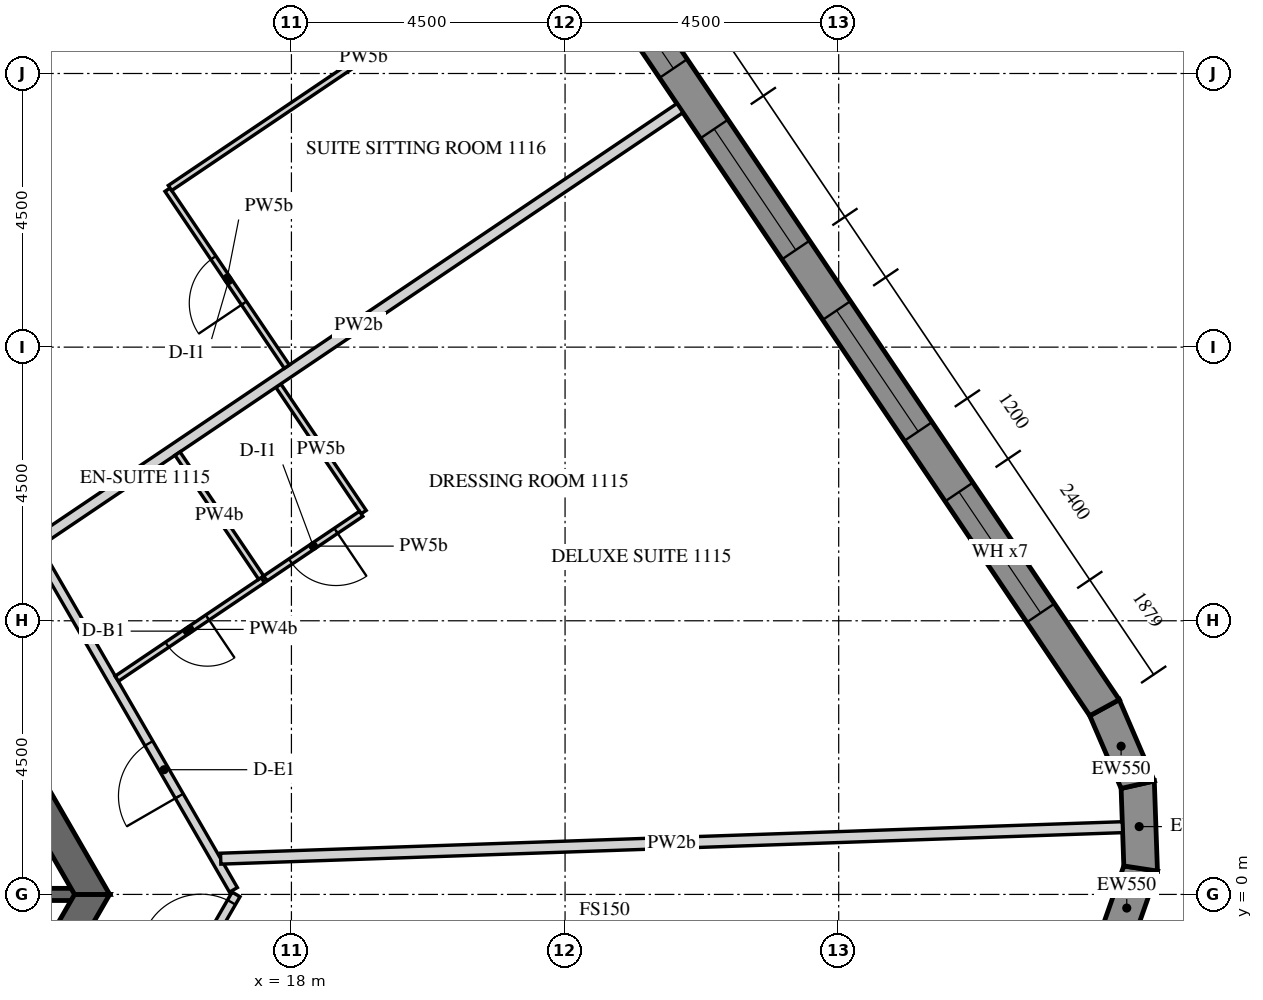
"""IFC4 building model, lengths in metres.
Left out: names, types, materials, properties, quantities, classifications, styles, units other than length and angle.
Written with IfcOpenShell. Run it as: python <this file> out.ifc"""

import sys

from ifc_helpers import new_model, si_unit, direction, frame, frame_2d, origin, place, context, subcontext, project, spatial, polyline, rectangle, outline, extrude, element, fill, save


model = new_model("IFC4")
c1 = context("Model", 3, precision=1e-05, world=origin(), true_north=direction((0.0, 1.0)))
c2 = subcontext(c1, "Body", "Model", "MODEL_VIEW")
j1 = project(units=[si_unit("LENGTHUNIT", "METRE"), si_unit("PLANEANGLEUNIT", "RADIAN")], contexts=[c1])
p1 = place(None, origin())
s1 = spatial("IfcSite", under=j1, at=p1, CompositionType="ELEMENT")
p2 = place(p1, origin())
s2 = spatial("IfcBuilding", under=s1, at=p2, CompositionType="ELEMENT")
p3 = place(p2, frame((0.0, 0.0, 156.6)))
s3 = spatial("IfcBuildingStorey", under=s2, at=p3, CompositionType="ELEMENT", Elevation=156.6)
p4 = place(p3, frame((31.509, -0.875, -0.15), z_axis=(0.0, 0.0, 1.0), x_axis=(0.33111537203, 0.943590276765, 0.0)))
e1 = element("IfcWall", 1, at=p4, inside=s3, PredefinedType="SOLIDWALL", context=c2, shape_type="SweptSolid", body=[
    extrude(outline(polyline([(-0.026, -0.275), (1.431, -0.275), (1.327, 0.275), (0.026, 0.275), (-0.026, -0.275)])), origin(), (0.0, 0.0, 1.0), 3.9),
])
p5 = place(p3, frame((31.966, 0.426, -0.15), z_axis=(0.0, 0.0, 1.0), x_axis=(-0.034876908462, 0.999391615562, 0.0)))
e2 = element("IfcWall", 2, at=p5, inside=s3, PredefinedType="SOLIDWALL", context=c2, shape_type="SweptSolid", body=[
    extrude(outline(polyline([(-0.052, -0.275), (1.431, -0.275), (1.327, 0.275), (0.052, 0.275), (-0.052, -0.275)])), origin(), (0.0, 0.0, 1.0), 3.9),
])
p6 = place(p3, frame((31.917, 1.804, -0.15), z_axis=(0.0, 0.0, 1.0), x_axis=(-0.396225741392, 0.918153125496, 0.0)))
e3 = element("IfcWall", 3, at=p6, inside=s3, PredefinedType="SOLIDWALL", context=c2, shape_type="SweptSolid", body=[
    extrude(outline(polyline([(-0.052, -0.275), (1.405, -0.275), (1.353, 0.275), (0.052, 0.275), (-0.052, -0.275)])), origin(), (0.0, 0.0, 1.0), 3.9),
])
p7 = place(p3, frame((31.371, 3.071, -0.15), z_axis=(0.0, 0.0, 1.0), x_axis=(-0.559189891278, 0.829039604297, 0.0)))
e4 = element("IfcWall", 4, at=p7, inside=s3, PredefinedType="SOLIDWALL", context=c2, shape_type="SweptSolid", body=[
    extrude(outline(polyline([(-0.026, -0.275), (27.781, -0.275), (27.736, 0.275), (0.026, 0.275), (-0.026, -0.275)])), origin(), (0.0, 0.0, 1.0), 3.9),
])
p8 = place(p7, frame((1.879, 0.0, 1.05)))
e5 = element("IfcOpeningElement", 5, at=p8, cuts=e4, PredefinedType="OPENING", context=c2, shape_type="SweptSolid", body=[
    extrude(rectangle(XDim=2.4, YDim=2.4, at=frame_2d((1.2, 1.2))), frame((0.0, 0.285, 0.0), z_axis=(0.0, -1.0, 0.0), x_axis=(1.0, 0.0, 0.0)), (0.0, 0.0, 1.0), 0.57),
])
p9 = place(p7, frame((5.479, 0.0, 1.05)))
e6 = element("IfcOpeningElement", 6, at=p9, cuts=e4, PredefinedType="OPENING", context=c2, shape_type="SweptSolid", body=[
    extrude(rectangle(XDim=2.4, YDim=2.4, at=frame_2d((1.2, 1.2))), frame((0.0, 0.285, 0.0), z_axis=(0.0, -1.0, 0.0), x_axis=(1.0, 0.0, 0.0)), (0.0, 0.0, 1.0), 0.57),
])
p10 = place(p7, frame((9.079, 0.0, 1.05)))
e7 = element("IfcOpeningElement", 7, at=p10, cuts=e4, PredefinedType="OPENING", context=c2, shape_type="SweptSolid", body=[
    extrude(rectangle(XDim=2.4, YDim=2.4, at=frame_2d((1.2, 1.2))), frame((0.0, 0.285, 0.0), z_axis=(0.0, -1.0, 0.0), x_axis=(1.0, 0.0, 0.0)), (0.0, 0.0, 1.0), 0.57),
])
p11 = place(p7, frame((12.679, 0.0, 1.05)))
e8 = element("IfcOpeningElement", 8, at=p11, cuts=e4, PredefinedType="OPENING", context=c2, shape_type="SweptSolid", body=[
    extrude(rectangle(XDim=2.4, YDim=2.4, at=frame_2d((1.2, 1.2))), frame((0.0, 0.285, 0.0), z_axis=(0.0, -1.0, 0.0), x_axis=(1.0, 0.0, 0.0)), (0.0, 0.0, 1.0), 0.57),
])
p12 = place(p7, frame((16.279, 0.0, 1.05)))
e9 = element("IfcOpeningElement", 9, at=p12, cuts=e4, PredefinedType="OPENING", context=c2, shape_type="SweptSolid", body=[
    extrude(rectangle(XDim=2.4, YDim=2.4, at=frame_2d((1.2, 1.2))), frame((0.0, 0.285, 0.0), z_axis=(0.0, -1.0, 0.0), x_axis=(1.0, 0.0, 0.0)), (0.0, 0.0, 1.0), 0.57),
])
p13 = place(p7, frame((19.879, 0.0, 1.05)))
e10 = element("IfcOpeningElement", 10, at=p13, cuts=e4, PredefinedType="OPENING", context=c2, shape_type="SweptSolid", body=[
    extrude(rectangle(XDim=2.4, YDim=2.4, at=frame_2d((1.2, 1.2))), frame((0.0, 0.285, 0.0), z_axis=(0.0, -1.0, 0.0), x_axis=(1.0, 0.0, 0.0)), (0.0, 0.0, 1.0), 0.57),
])
p14 = place(p7, frame((23.479, 0.0, 1.05)))
e11 = element("IfcOpeningElement", 11, at=p14, cuts=e4, PredefinedType="OPENING", context=c2, shape_type="SweptSolid", body=[
    extrude(rectangle(XDim=2.4, YDim=2.4, at=frame_2d((1.2, 1.2))), frame((0.0, 0.285, 0.0), z_axis=(0.0, -1.0, 0.0), x_axis=(1.0, 0.0, 0.0)), (0.0, 0.0, 1.0), 0.57),
])
p15 = place(p3, frame((7.361, -12.75, -0.15), z_axis=(0.0, 0.0, 1.0), x_axis=(0.50000571537, 0.866022103989, 0.0)))
e12 = element("IfcWall", 12, at=p15, inside=s3, PredefinedType="SHEAR", context=c2, shape_type="SweptSolid", body=[
    extrude(outline(polyline([(-0.144, -0.25), (14.867, -0.25), (14.578, 0.25), (0.144, 0.25), (-0.144, -0.25)])), origin(), (0.0, 0.0, 1.0), 3.9),
])
p16 = place(p15, frame((6.49, 0.0, 0.15)))
e13 = element("IfcOpeningElement", 13, at=p16, cuts=e12, PredefinedType="OPENING", context=c2, shape_type="SweptSolid", body=[
    extrude(rectangle(XDim=1.8, YDim=2.4, at=frame_2d((0.9, 1.2))), frame((0.0, 0.26, 0.0), z_axis=(0.0, -1.0, 0.0), x_axis=(1.0, 0.0, 0.0)), (0.0, 0.0, 1.0), 0.52),
])
p17 = place(p3, frame((14.722, 0.0, -0.15), z_axis=(0.0, 0.0, 1.0), x_axis=(-0.50000571537, 0.866022103989, 0.0)))
e14 = element("IfcWall", 14, at=p17, inside=s3, PredefinedType="SHEAR", context=c2, shape_type="SweptSolid", body=[
    extrude(outline(polyline([(-0.144, -0.25), (14.867, -0.25), (14.578, 0.25), (0.144, 0.25), (-0.144, -0.25)])), origin(), (0.0, 0.0, 1.0), 3.9),
])
p18 = place(p17, frame((6.432, 0.0, 0.15)))
e15 = element("IfcOpeningElement", 15, at=p18, cuts=e14, PredefinedType="OPENING", context=c2, shape_type="SweptSolid", body=[
    extrude(rectangle(XDim=1.8, YDim=2.4, at=frame_2d((0.9, 1.2))), frame((0.0, 0.26, 0.0), z_axis=(0.0, -1.0, 0.0), x_axis=(1.0, 0.0, 0.0)), (0.0, 0.0, 1.0), 0.52),
])
p19 = place(p3, frame((7.506, 13.0, -0.15), z_axis=(0.0, 0.0, 1.0), x_axis=(0.499988271576, 0.866032175087, 0.0)))
e16 = element("IfcWall", 16, at=p19, inside=s3, PredefinedType="SHEAR", context=c2, shape_type="SweptSolid", body=[
    extrude(rectangle(XDim=15.424, YDim=0.5, at=frame_2d((7.712, 0.0))), origin(), (0.0, 0.0, 1.0), 3.9),
])
p20 = place(p19, frame((6.812, 0.0, 0.15)))
e17 = element("IfcOpeningElement", 17, at=p20, cuts=e16, PredefinedType="OPENING", context=c2, shape_type="SweptSolid", body=[
    extrude(rectangle(XDim=1.8, YDim=2.4, at=frame_2d((0.9, 1.2))), frame((0.0, 0.26, 0.0), z_axis=(0.0, -1.0, 0.0), x_axis=(1.0, 0.0, 0.0)), (0.0, 0.0, 1.0), 0.52),
])
p21 = place(p3, frame((11.547, 0.0, -0.15), z_axis=(0.0, 0.0, 1.0), x_axis=(1.0, 0.0, 0.0)))
e18 = element("IfcWall", 18, at=p21, inside=s3, PredefinedType="SHEAR", context=c2, shape_type="SweptSolid", body=[
    extrude(rectangle(XDim=2.887, YDim=0.2, at=frame_2d((1.443, 0.0))), origin(), (0.0, 0.0, 1.0), 3.9),
])
p22 = place(p3, frame((10.714, -11.043, 0.0), z_axis=(0.0, 0.0, 1.0), x_axis=(0.500001980452, 0.866024260367, 0.0)))
e19 = element("IfcWall", 19, at=p22, inside=s3, PredefinedType="PARTITIONING", context=c2, shape_type="SweptSolid", body=[
    extrude(rectangle(XDim=12.752, YDim=0.15, at=frame_2d((6.376, 0.0))), origin(), (0.0, 0.0, 1.0), 2.823),
])
p23 = place(p22, frame((3.625, 0.0, 0.0)))
e20 = element("IfcOpeningElement", 20, at=p23, cuts=e19, PredefinedType="OPENING", context=c2, shape_type="SweptSolid", body=[
    extrude(rectangle(XDim=1.0, YDim=2.1, at=frame_2d((0.5, 1.05))), frame((0.0, 0.085, 0.0), z_axis=(0.0, -1.0, 0.0), x_axis=(1.0, 0.0, 0.0)), (0.0, 0.0, 1.0), 0.17),
])
p24 = place(p22, frame((11.602, 0.0, 0.0)))
e21 = element("IfcOpeningElement", 21, at=p24, cuts=e19, PredefinedType="OPENING", context=c2, shape_type="SweptSolid", body=[
    extrude(rectangle(XDim=1.0, YDim=2.1, at=frame_2d((0.5, 1.05))), frame((0.0, 0.085, 0.0), z_axis=(0.0, -1.0, 0.0), x_axis=(1.0, 0.0, 0.0)), (0.0, 0.0, 1.0), 0.17),
])
p25 = place(p3, frame((17.046, 0.075, 0.0), z_axis=(0.0, 0.0, 1.0), x_axis=(-0.499999403554, 0.866025748143, 0.0)))
e22 = element("IfcWall", 22, at=p25, inside=s3, PredefinedType="PARTITIONING", context=c2, shape_type="SweptSolid", body=[
    extrude(rectangle(XDim=14.549, YDim=0.15, at=frame_2d((7.275, 0.0))), origin(), (0.0, 0.0, 1.0), 2.823),
])
p26 = place(p25, frame((1.781, 0.0, 0.0)))
e23 = element("IfcOpeningElement", 23, at=p26, cuts=e22, PredefinedType="OPENING", context=c2, shape_type="SweptSolid", body=[
    extrude(rectangle(XDim=1.0, YDim=2.1, at=frame_2d((0.5, 1.05))), frame((0.0, 0.085, 0.0), z_axis=(0.0, -1.0, 0.0), x_axis=(1.0, 0.0, 0.0)), (0.0, 0.0, 1.0), 0.17),
])
p27 = place(p25, frame((8.705, 0.0, 0.0)))
e24 = element("IfcOpeningElement", 24, at=p27, cuts=e22, PredefinedType="OPENING", context=c2, shape_type="SweptSolid", body=[
    extrude(rectangle(XDim=1.0, YDim=2.1, at=frame_2d((0.5, 1.05))), frame((0.0, 0.085, 0.0), z_axis=(0.0, -1.0, 0.0), x_axis=(1.0, 0.0, 0.0)), (0.0, 0.0, 1.0), 0.17),
])
p28 = place(p3, frame((31.667, 1.106, 0.0), z_axis=(0.0, 0.0, 1.0), x_axis=(-0.999390937365, -0.034896336667, 0.0)))
e25 = element("IfcWall", 25, at=p28, inside=s3, PredefinedType="PARTITIONING", context=c2, shape_type="SweptSolid", body=[
    extrude(rectangle(XDim=14.839, YDim=0.18, at=frame_2d((7.419, 0.0))), origin(), (0.0, 0.0, 1.0), 2.823),
])
p29 = place(p3, frame((17.53, 5.168, 0.0), z_axis=(0.0, 0.0, 1.0), x_axis=(-0.829031257997, -0.559202265073, 0.0)))
e26 = element("IfcWall", 26, at=p29, inside=s3, PredefinedType="PARTITIONING", context=c2, shape_type="SweptSolid", body=[
    extrude(rectangle(XDim=2.898, YDim=0.1, at=frame_2d((1.449, 0.0))), origin(), (0.0, 0.0, 1.0), 2.823),
])
p30 = place(p29, frame((1.1, 0.0, 0.0)))
e27 = element("IfcOpeningElement", 27, at=p30, cuts=e26, PredefinedType="OPENING", context=c2, shape_type="SweptSolid", body=[
    extrude(rectangle(XDim=0.8, YDim=2.1, at=frame_2d((0.4, 1.05))), frame((0.0, 0.06, 0.0), z_axis=(0.0, -1.0, 0.0), x_axis=(1.0, 0.0, 0.0)), (0.0, 0.0, 1.0), 0.12),
])
p31 = place(p3, frame((17.785, 8.368, 0.0), z_axis=(0.0, 0.0, 1.0), x_axis=(0.559203861497, -0.829030181168, 0.0)))
e28 = element("IfcWall", 28, at=p31, inside=s3, PredefinedType="PARTITIONING", context=c2, shape_type="SweptSolid", body=[
    extrude(rectangle(XDim=2.51, YDim=0.1, at=frame_2d((1.255, 0.0))), origin(), (0.0, 0.0, 1.0), 2.823),
])
p32 = place(p3, frame((19.147, 6.259, 0.0), z_axis=(0.0, 0.0, 1.0), x_axis=(-0.82903334026, -0.559199178055, 0.0)))
e29 = element("IfcWall", 29, at=p32, inside=s3, PredefinedType="PARTITIONING", context=c2, shape_type="SweptSolid", body=[
    extrude(rectangle(XDim=1.9, YDim=0.1, at=frame_2d((0.95, 0.0))), origin(), (0.0, 0.0, 1.0), 2.823),
])
p33 = place(p32, frame((0.5, 0.0, 0.0)))
e30 = element("IfcOpeningElement", 30, at=p33, cuts=e29, PredefinedType="OPENING", context=c2, shape_type="SweptSolid", body=[
    extrude(rectangle(XDim=0.9, YDim=2.1, at=frame_2d((0.45, 1.05))), frame((0.0, 0.06, 0.0), z_axis=(0.0, -1.0, 0.0), x_axis=(1.0, 0.0, 0.0)), (0.0, 0.0, 1.0), 0.12),
])
p34 = place(p3, frame((24.389, 12.931, 0.0), z_axis=(0.0, 0.0, 1.0), x_axis=(-0.829049407957, -0.559175356365, 0.0)))
e31 = element("IfcWall", 31, at=p34, inside=s3, PredefinedType="PARTITIONING", context=c2, shape_type="SweptSolid", body=[
    extrude(rectangle(XDim=12.743, YDim=0.18, at=frame_2d((6.372, 0.0))), origin(), (0.0, 0.0, 1.0), 2.823),
])
p35 = place(p3, frame((17.502, 5.21, 0.0), z_axis=(0.0, 0.0, 1.0), x_axis=(-0.559203533395, 0.829030402481, 0.0)))
e32 = element("IfcWall", 32, at=p35, inside=s3, PredefinedType="PARTITIONING", context=c2, shape_type="SweptSolid", body=[
    extrude(rectangle(XDim=2.46, YDim=0.1, at=frame_2d((1.23, 0.0))), origin(), (0.0, 0.0, 1.0), 2.823),
])
p36 = place(p3, frame((17.925, 8.679, 0.0), z_axis=(0.0, 0.0, 1.0), x_axis=(-0.559170576854, 0.829052631611, 0.0)))
e33 = element("IfcWall", 33, at=p36, inside=s3, PredefinedType="PARTITIONING", context=c2, shape_type="SweptSolid", body=[
    extrude(rectangle(XDim=3.51, YDim=0.1, at=frame_2d((1.755, 0.0))), origin(), (0.0, 0.0, 1.0), 2.823),
])
p37 = place(p36, frame((1.26, 0.0, 0.0)))
e34 = element("IfcOpeningElement", 34, at=p37, cuts=e33, PredefinedType="OPENING", context=c2, shape_type="SweptSolid", body=[
    extrude(rectangle(XDim=0.9, YDim=2.1, at=frame_2d((0.45, 1.05))), frame((0.0, 0.06, 0.0), z_axis=(0.0, -1.0, 0.0), x_axis=(1.0, 0.0, 0.0)), (0.0, 0.0, 1.0), 0.12),
])
p38 = place(p3, frame((16.003, 11.617, 0.0), z_axis=(0.0, 0.0, 1.0), x_axis=(0.829037886281, 0.559192438352, 0.0)))
e35 = element("IfcWall", 35, at=p38, inside=s3, PredefinedType="PARTITIONING", context=c2, shape_type="SweptSolid", body=[
    extrude(rectangle(XDim=7.687, YDim=0.1, at=frame_2d((3.843, 0.0))), origin(), (0.0, 0.0, 1.0), 2.823),
])
p39 = place(p8, frame((0.0, 0.205, 0.0)))
e36 = element("IfcWindow", 36, at=p39, inside=s3, PartitioningType="DOUBLE_PANEL_VERTICAL", PredefinedType="WINDOW", context=c2, shape_type="SweptSolid", body=[
    extrude(rectangle(XDim=2.4, YDim=2.4, at=frame_2d((1.2, 1.2))), frame((0.0, 0.03, 0.0), z_axis=(0.0, -1.0, 0.0), x_axis=(1.0, 0.0, 0.0)), (0.0, 0.0, 1.0), 0.06),
])
fill(e5, e36)
p40 = place(p9, frame((0.0, 0.205, 0.0)))
e37 = element("IfcWindow", 37, at=p40, inside=s3, PartitioningType="DOUBLE_PANEL_VERTICAL", PredefinedType="WINDOW", context=c2, shape_type="SweptSolid", body=[
    extrude(rectangle(XDim=2.4, YDim=2.4, at=frame_2d((1.2, 1.2))), frame((0.0, 0.03, 0.0), z_axis=(0.0, -1.0, 0.0), x_axis=(1.0, 0.0, 0.0)), (0.0, 0.0, 1.0), 0.06),
])
fill(e6, e37)
p41 = place(p10, frame((0.0, 0.205, 0.0)))
e38 = element("IfcWindow", 38, at=p41, inside=s3, PartitioningType="DOUBLE_PANEL_VERTICAL", PredefinedType="WINDOW", context=c2, shape_type="SweptSolid", body=[
    extrude(rectangle(XDim=2.4, YDim=2.4, at=frame_2d((1.2, 1.2))), frame((0.0, 0.03, 0.0), z_axis=(0.0, -1.0, 0.0), x_axis=(1.0, 0.0, 0.0)), (0.0, 0.0, 1.0), 0.06),
])
fill(e7, e38)
p42 = place(p11, frame((0.0, 0.205, 0.0)))
e39 = element("IfcWindow", 39, at=p42, inside=s3, PartitioningType="DOUBLE_PANEL_VERTICAL", PredefinedType="WINDOW", context=c2, shape_type="SweptSolid", body=[
    extrude(rectangle(XDim=2.4, YDim=2.4, at=frame_2d((1.2, 1.2))), frame((0.0, 0.03, 0.0), z_axis=(0.0, -1.0, 0.0), x_axis=(1.0, 0.0, 0.0)), (0.0, 0.0, 1.0), 0.06),
])
fill(e8, e39)
p43 = place(p24, origin())
e40 = element("IfcDoor", 40, at=p43, inside=s3, OperationType="SINGLE_SWING_LEFT", PredefinedType="DOOR", context=c2, shape_type="SweptSolid", body=[
    extrude(rectangle(XDim=1.0, YDim=2.1, at=frame_2d((0.5, 1.05))), frame((0.0, 0.025, 0.0), z_axis=(0.0, -1.0, 0.0), x_axis=(1.0, 0.0, 0.0)), (0.0, 0.0, 1.0), 0.05),
])
fill(e21, e40)
p44 = place(p26, origin())
e41 = element("IfcDoor", 41, at=p44, inside=s3, OperationType="SINGLE_SWING_LEFT", PredefinedType="DOOR", context=c2, shape_type="SweptSolid", body=[
    extrude(rectangle(XDim=1.0, YDim=2.1, at=frame_2d((0.5, 1.05))), frame((0.0, 0.025, 0.0), z_axis=(0.0, -1.0, 0.0), x_axis=(1.0, 0.0, 0.0)), (0.0, 0.0, 1.0), 0.05),
])
fill(e23, e41)
p45 = place(p30, origin())
e42 = element("IfcDoor", 42, at=p45, inside=s3, OperationType="SINGLE_SWING_LEFT", PredefinedType="DOOR", context=c2, shape_type="SweptSolid", body=[
    extrude(rectangle(XDim=0.8, YDim=2.1, at=frame_2d((0.4, 1.05))), frame((0.0, 0.025, 0.0), z_axis=(0.0, -1.0, 0.0), x_axis=(1.0, 0.0, 0.0)), (0.0, 0.0, 1.0), 0.05),
])
fill(e27, e42)
p46 = place(p33, origin())
e43 = element("IfcDoor", 43, at=p46, inside=s3, OperationType="SINGLE_SWING_RIGHT", PredefinedType="DOOR", context=c2, shape_type="SweptSolid", body=[
    extrude(rectangle(XDim=0.9, YDim=2.1, at=frame_2d((0.45, 1.05))), frame((0.0, 0.025, 0.0), z_axis=(0.0, -1.0, 0.0), x_axis=(1.0, 0.0, 0.0)), (0.0, 0.0, 1.0), 0.05),
])
fill(e30, e43)
p47 = place(p37, origin())
e44 = element("IfcDoor", 44, at=p47, inside=s3, OperationType="SINGLE_SWING_RIGHT", PredefinedType="DOOR", context=c2, shape_type="SweptSolid", body=[
    extrude(rectangle(XDim=0.9, YDim=2.1, at=frame_2d((0.45, 1.05))), frame((0.0, 0.025, 0.0), z_axis=(0.0, -1.0, 0.0), x_axis=(1.0, 0.0, 0.0)), (0.0, 0.0, 1.0), 0.05),
])
fill(e34, e44)
save(model, sys.argv[1])
